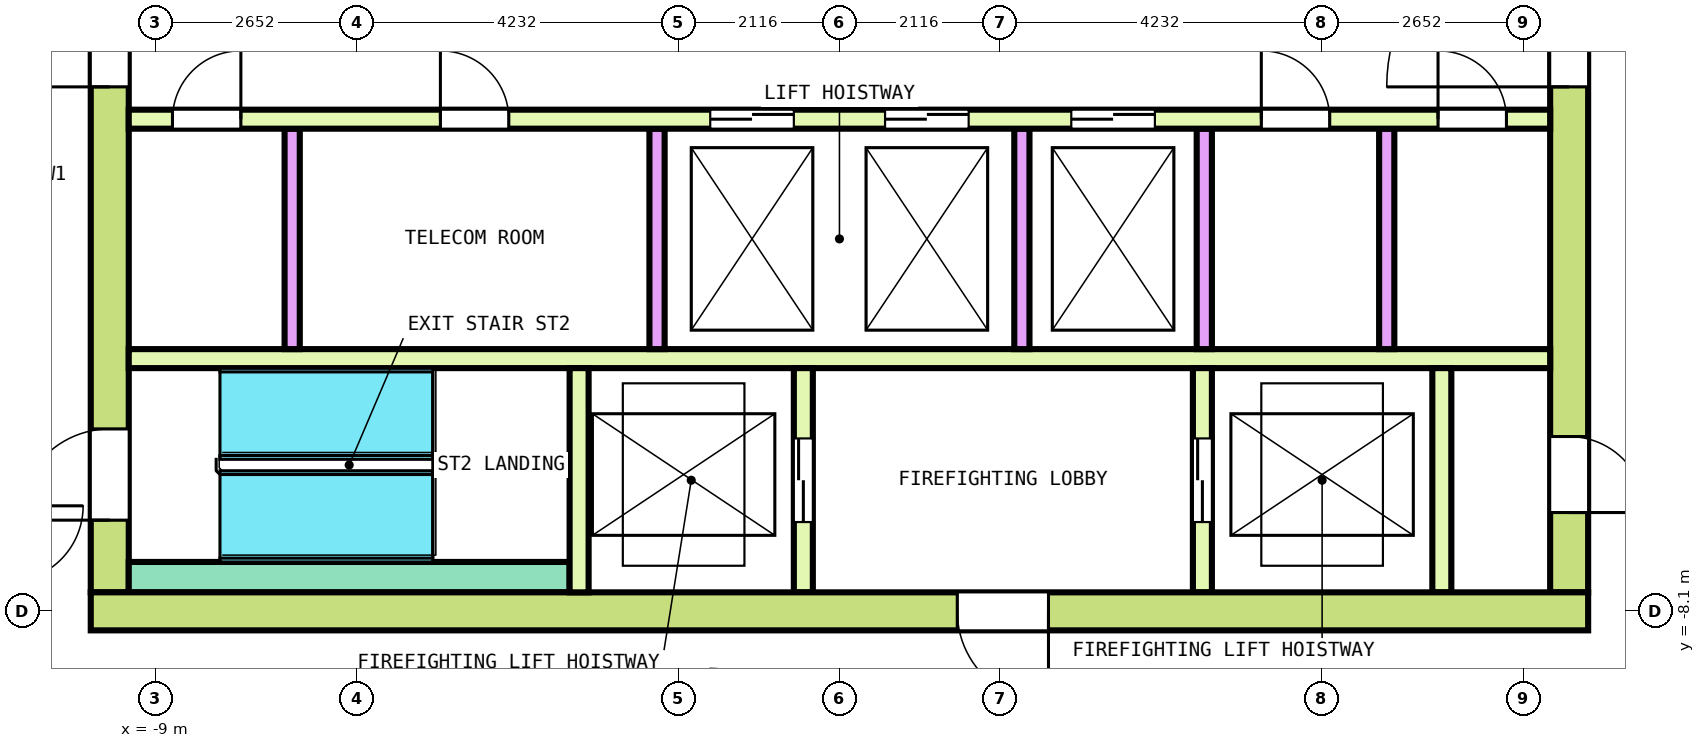
"""IFC4 building model, lengths in metres.
Left out: names, types, materials, properties, quantities, classifications, styles, units other than length and angle.
Written with IfcOpenShell. Run it as: python <this file> out.ifc"""

import sys

from ifc_helpers import new_model, si_unit, direction, frame, frame_2d, origin, place, context, subcontext, project, spatial, rectangle, extrude, element, fill, save


model = new_model("IFC4")
c1 = context("Model", 3, precision=1e-05, world=origin(), true_north=direction((0.0, 1.0)))
c2 = subcontext(c1, "Body", "Model", "MODEL_VIEW")
j1 = project(units=[si_unit("LENGTHUNIT", "METRE"), si_unit("PLANEANGLEUNIT", "RADIAN")], contexts=[c1])
p1 = place(None, origin())
s1 = spatial("IfcSite", under=j1, at=p1, CompositionType="ELEMENT")
p2 = place(p1, origin())
s2 = spatial("IfcBuilding", under=s1, at=p2, CompositionType="ELEMENT")
p3 = place(p2, frame((0.0, 0.0, 275.0)))
s3 = spatial("IfcBuildingStorey", under=s2, at=p3, CompositionType="ELEMENT", Elevation=275.0)
p4 = place(p3, frame((-9.85, -8.1, 0.0), z_axis=(0.0, 0.0, 1.0), x_axis=(1.0, 0.0, 0.0)))
e1 = element("IfcWall", 1, at=p4, inside=s3, PredefinedType="SHEAR", context=c2, shape_type="SweptSolid", body=[
    extrude(rectangle(XDim=19.7, YDim=0.5, at=frame_2d((9.85, 0.0))), origin(), (0.0, 0.0, 1.0), 3.7),
])
p5 = place(p4, frame((11.4, 0.0, 0.0)))
e2 = element("IfcOpeningElement", 2, at=p5, cuts=e1, PredefinedType="OPENING", context=c2, shape_type="SweptSolid", body=[
    extrude(rectangle(XDim=1.2, YDim=2.1, at=frame_2d((0.6, 1.05))), frame((0.0, 0.26, 0.0), z_axis=(0.0, -1.0, 0.0), x_axis=(1.0, 0.0, 0.0)), (0.0, 0.0, 1.0), 0.52),
])
p6 = place(p3, frame((-9.6, -7.85, 0.0), z_axis=(0.0, 0.0, 1.0), x_axis=(0.0, 1.0, 0.0)))
e3 = element("IfcWall", 3, at=p6, inside=s3, PredefinedType="SHEAR", context=c2, shape_type="SweptSolid", body=[
    extrude(rectangle(XDim=15.7, YDim=0.5, at=frame_2d((7.85, 0.0))), origin(), (0.0, 0.0, 1.0), 3.7),
])
p7 = place(p6, frame((6.65, 0.0, 0.0)))
e4 = element("IfcOpeningElement", 4, at=p7, cuts=e3, PredefinedType="OPENING", context=c2, shape_type="SweptSolid", body=[
    extrude(rectangle(XDim=2.4, YDim=2.1, at=frame_2d((1.2, 1.05))), frame((0.0, 0.26, 0.0), z_axis=(0.0, -1.0, 0.0), x_axis=(1.0, 0.0, 0.0)), (0.0, 0.0, 1.0), 0.52),
])
p8 = place(p6, frame((13.55, 0.0, 0.0)))
e5 = element("IfcOpeningElement", 5, at=p8, cuts=e3, PredefinedType="OPENING", context=c2, shape_type="SweptSolid", body=[
    extrude(rectangle(XDim=1.2, YDim=2.1, at=frame_2d((0.6, 1.05))), frame((0.0, 0.26, 0.0), z_axis=(0.0, -1.0, 0.0), x_axis=(1.0, 0.0, 0.0)), (0.0, 0.0, 1.0), 0.52),
])
p9 = place(p6, frame((0.95, 0.0, 0.0)))
e6 = element("IfcOpeningElement", 6, at=p9, cuts=e3, PredefinedType="OPENING", context=c2, shape_type="SweptSolid", body=[
    extrude(rectangle(XDim=1.2, YDim=2.1, at=frame_2d((0.6, 1.05))), frame((0.0, 0.26, 0.0), z_axis=(0.0, -1.0, 0.0), x_axis=(1.0, 0.0, 0.0)), (0.0, 0.0, 1.0), 0.52),
])
p10 = place(p3, frame((9.6, -7.85, 0.0), z_axis=(0.0, 0.0, 1.0), x_axis=(0.0, 1.0, 0.0)))
e7 = element("IfcWall", 7, at=p10, inside=s3, PredefinedType="SHEAR", context=c2, shape_type="SweptSolid", body=[
    extrude(rectangle(XDim=15.7, YDim=0.5, at=frame_2d((7.85, 0.0))), origin(), (0.0, 0.0, 1.0), 3.7),
])
p11 = place(p10, frame((6.65, 0.0, 0.0)))
e8 = element("IfcOpeningElement", 8, at=p11, cuts=e7, PredefinedType="OPENING", context=c2, shape_type="SweptSolid", body=[
    extrude(rectangle(XDim=2.4, YDim=2.1, at=frame_2d((1.2, 1.05))), frame((0.0, 0.26, 0.0), z_axis=(0.0, -1.0, 0.0), x_axis=(1.0, 0.0, 0.0)), (0.0, 0.0, 1.0), 0.52),
])
p12 = place(p10, frame((13.55, 0.0, 0.0)))
e9 = element("IfcOpeningElement", 9, at=p12, cuts=e7, PredefinedType="OPENING", context=c2, shape_type="SweptSolid", body=[
    extrude(rectangle(XDim=1.2, YDim=2.1, at=frame_2d((0.6, 1.05))), frame((0.0, 0.26, 0.0), z_axis=(0.0, -1.0, 0.0), x_axis=(1.0, 0.0, 0.0)), (0.0, 0.0, 1.0), 0.52),
])
p13 = place(p10, frame((1.05, 0.0, 0.0)))
e10 = element("IfcOpeningElement", 10, at=p13, cuts=e7, PredefinedType="OPENING", context=c2, shape_type="SweptSolid", body=[
    extrude(rectangle(XDim=1.0, YDim=2.1, at=frame_2d((0.5, 1.05))), frame((0.0, 0.26, 0.0), z_axis=(0.0, -1.0, 0.0), x_axis=(1.0, 0.0, 0.0)), (0.0, 0.0, 1.0), 0.52),
])
p14 = place(p3, frame((-9.35, -1.625, 0.0), z_axis=(0.0, 0.0, 1.0), x_axis=(1.0, 0.0, 0.0)))
e11 = element("IfcWall", 11, at=p14, inside=s3, PredefinedType="SOLIDWALL", context=c2, shape_type="SweptSolid", body=[
    extrude(rectangle(XDim=18.7, YDim=0.25, at=frame_2d((9.35, 0.0))), origin(), (0.0, 0.0, 1.0), 3.7),
])
p15 = place(p14, frame((7.65, 0.0, 0.0)))
e12 = element("IfcOpeningElement", 12, at=p15, cuts=e11, PredefinedType="OPENING", context=c2, shape_type="SweptSolid", body=[
    extrude(rectangle(XDim=1.1, YDim=2.1, at=frame_2d((0.55, 1.05))), frame((0.0, 0.135, 0.0), z_axis=(0.0, -1.0, 0.0), x_axis=(1.0, 0.0, 0.0)), (0.0, 0.0, 1.0), 0.27),
])
p16 = place(p14, frame((9.95, 0.0, 0.0)))
e13 = element("IfcOpeningElement", 13, at=p16, cuts=e11, PredefinedType="OPENING", context=c2, shape_type="SweptSolid", body=[
    extrude(rectangle(XDim=1.1, YDim=2.1, at=frame_2d((0.55, 1.05))), frame((0.0, 0.135, 0.0), z_axis=(0.0, -1.0, 0.0), x_axis=(1.0, 0.0, 0.0)), (0.0, 0.0, 1.0), 0.27),
])
p17 = place(p14, frame((12.4, 0.0, 0.0)))
e14 = element("IfcOpeningElement", 14, at=p17, cuts=e11, PredefinedType="OPENING", context=c2, shape_type="SweptSolid", body=[
    extrude(rectangle(XDim=1.1, YDim=2.1, at=frame_2d((0.55, 1.05))), frame((0.0, 0.135, 0.0), z_axis=(0.0, -1.0, 0.0), x_axis=(1.0, 0.0, 0.0)), (0.0, 0.0, 1.0), 0.27),
])
p18 = place(p14, frame((0.575, 0.0, 0.0)))
e15 = element("IfcOpeningElement", 15, at=p18, cuts=e11, PredefinedType="OPENING", context=c2, shape_type="SweptSolid", body=[
    extrude(rectangle(XDim=0.9, YDim=2.1, at=frame_2d((0.45, 1.05))), frame((0.0, 0.135, 0.0), z_axis=(0.0, -1.0, 0.0), x_axis=(1.0, 0.0, 0.0)), (0.0, 0.0, 1.0), 0.27),
])
p19 = place(p14, frame((4.1, 0.0, 0.0)))
e16 = element("IfcOpeningElement", 16, at=p19, cuts=e11, PredefinedType="OPENING", context=c2, shape_type="SweptSolid", body=[
    extrude(rectangle(XDim=0.9, YDim=2.1, at=frame_2d((0.45, 1.05))), frame((0.0, 0.135, 0.0), z_axis=(0.0, -1.0, 0.0), x_axis=(1.0, 0.0, 0.0)), (0.0, 0.0, 1.0), 0.27),
])
p20 = place(p14, frame((14.9, 0.0, 0.0)))
e17 = element("IfcOpeningElement", 17, at=p20, cuts=e11, PredefinedType="OPENING", context=c2, shape_type="SweptSolid", body=[
    extrude(rectangle(XDim=0.9, YDim=2.1, at=frame_2d((0.45, 1.05))), frame((0.0, 0.135, 0.0), z_axis=(0.0, -1.0, 0.0), x_axis=(1.0, 0.0, 0.0)), (0.0, 0.0, 1.0), 0.27),
])
p21 = place(p14, frame((17.225, 0.0, 0.0)))
e18 = element("IfcOpeningElement", 18, at=p21, cuts=e11, PredefinedType="OPENING", context=c2, shape_type="SweptSolid", body=[
    extrude(rectangle(XDim=0.9, YDim=2.1, at=frame_2d((0.45, 1.05))), frame((0.0, 0.135, 0.0), z_axis=(0.0, -1.0, 0.0), x_axis=(1.0, 0.0, 0.0)), (0.0, 0.0, 1.0), 0.27),
])
p22 = place(p3, frame((-9.35, -4.775, 0.0), z_axis=(0.0, 0.0, 1.0), x_axis=(1.0, 0.0, 0.0)))
e19 = element("IfcWall", 19, at=p22, inside=s3, PredefinedType="SOLIDWALL", context=c2, shape_type="SweptSolid", body=[
    extrude(rectangle(XDim=18.7, YDim=0.25, at=frame_2d((9.35, 0.0))), origin(), (0.0, 0.0, 1.0), 3.7),
])
for number, where, z_axis, x_axis in (
    (20, (-7.2, -4.65, 0.0), (0.0, 0.0, 1.0), (0.0, 1.0, 0.0)),
    (21, (-2.4, -4.65, 0.0), (0.0, 0.0, 1.0), (0.0, 1.0, 0.0)),
    (22, (2.4, -4.65, 0.0), (0.0, 0.0, 1.0), (0.0, 1.0, 0.0)),
    (23, (4.8, -4.65, 0.0), (0.0, 0.0, 1.0), (0.0, 1.0, 0.0)),
    (24, (7.2, -4.65, 0.0), (0.0, 0.0, 1.0), (0.0, 1.0, 0.0)),
):
    element("IfcWall", number, at=place(p3, frame(where, z_axis=z_axis, x_axis=x_axis)), inside=s3, PredefinedType="SOLIDWALL", context=c2, shape_type="SweptSolid", body=[
        extrude(rectangle(XDim=2.9, YDim=0.2, at=frame_2d((1.45, 0.0))), origin(), (0.0, 0.0, 1.0), 3.7),
    ])
p23 = place(p3, frame((-9.35, -7.65, 0.0), z_axis=(0.0, 0.0, 1.0), x_axis=(1.0, 0.0, 0.0)))
e25 = element("IfcWall", 25, at=p23, inside=s3, PredefinedType="SOLIDWALL", context=c2, shape_type="SweptSolid", body=[
    extrude(rectangle(XDim=5.8, YDim=0.4, at=frame_2d((2.9, 0.0))), origin(), (0.0, 0.0, 1.0), 3.7),
])
p24 = place(p3, frame((-3.425, -7.85, 0.0), z_axis=(0.0, 0.0, 1.0), x_axis=(0.0, 1.0, 0.0)))
e26 = element("IfcWall", 26, at=p24, inside=s3, PredefinedType="SOLIDWALL", context=c2, shape_type="SweptSolid", body=[
    extrude(rectangle(XDim=2.95, YDim=0.25, at=frame_2d((1.475, 0.0))), origin(), (0.0, 0.0, 1.0), 3.7),
])
p25 = place(p3, frame((-0.475, -7.85, 0.0), z_axis=(0.0, 0.0, 1.0), x_axis=(0.0, 1.0, 0.0)))
e27 = element("IfcWall", 27, at=p25, inside=s3, PredefinedType="SOLIDWALL", context=c2, shape_type="SweptSolid", body=[
    extrude(rectangle(XDim=2.95, YDim=0.25, at=frame_2d((1.475, 0.0))), origin(), (0.0, 0.0, 1.0), 3.7),
])
p26 = place(p25, frame((0.925, 0.0, 0.0)))
e28 = element("IfcOpeningElement", 28, at=p26, cuts=e27, PredefinedType="OPENING", context=c2, shape_type="SweptSolid", body=[
    extrude(rectangle(XDim=1.1, YDim=2.1, at=frame_2d((0.55, 1.05))), frame((0.0, 0.135, 0.0), z_axis=(0.0, -1.0, 0.0), x_axis=(1.0, 0.0, 0.0)), (0.0, 0.0, 1.0), 0.27),
])
p27 = place(p3, frame((4.775, -7.85, 0.0), z_axis=(0.0, 0.0, 1.0), x_axis=(0.0, 1.0, 0.0)))
e29 = element("IfcWall", 29, at=p27, inside=s3, PredefinedType="SOLIDWALL", context=c2, shape_type="SweptSolid", body=[
    extrude(rectangle(XDim=2.95, YDim=0.25, at=frame_2d((1.475, 0.0))), origin(), (0.0, 0.0, 1.0), 3.7),
])
p28 = place(p27, frame((0.925, 0.0, 0.0)))
e30 = element("IfcOpeningElement", 30, at=p28, cuts=e29, PredefinedType="OPENING", context=c2, shape_type="SweptSolid", body=[
    extrude(rectangle(XDim=1.1, YDim=2.1, at=frame_2d((0.55, 1.05))), frame((0.0, 0.135, 0.0), z_axis=(0.0, -1.0, 0.0), x_axis=(1.0, 0.0, 0.0)), (0.0, 0.0, 1.0), 0.27),
])
p29 = place(p3, frame((7.925, -7.85, 0.0), z_axis=(0.0, 0.0, 1.0), x_axis=(0.0, 1.0, 0.0)))
e31 = element("IfcWall", 31, at=p29, inside=s3, PredefinedType="SOLIDWALL", context=c2, shape_type="SweptSolid", body=[
    extrude(rectangle(XDim=2.95, YDim=0.25, at=frame_2d((1.475, 0.0))), origin(), (0.0, 0.0, 1.0), 3.7),
])
p30 = place(p15, origin())
e32 = element("IfcDoor", 32, at=p30, inside=s3, OperationType="DOUBLE_DOOR_SLIDING", PredefinedType="DOOR", context=c2, shape_type="SweptSolid", body=[
    extrude(rectangle(XDim=1.1, YDim=2.1, at=frame_2d((0.55, 1.05))), frame((0.0, 0.075, 0.0), z_axis=(0.0, -1.0, 0.0), x_axis=(1.0, 0.0, 0.0)), (0.0, 0.0, 1.0), 0.15),
])
fill(e12, e32)
p31 = place(p16, origin())
e33 = element("IfcDoor", 33, at=p31, inside=s3, OperationType="DOUBLE_DOOR_SLIDING", PredefinedType="DOOR", context=c2, shape_type="SweptSolid", body=[
    extrude(rectangle(XDim=1.1, YDim=2.1, at=frame_2d((0.55, 1.05))), frame((0.0, 0.075, 0.0), z_axis=(0.0, -1.0, 0.0), x_axis=(1.0, 0.0, 0.0)), (0.0, 0.0, 1.0), 0.15),
])
fill(e13, e33)
p32 = place(p17, origin())
e34 = element("IfcDoor", 34, at=p32, inside=s3, OperationType="DOUBLE_DOOR_SLIDING", PredefinedType="DOOR", context=c2, shape_type="SweptSolid", body=[
    extrude(rectangle(XDim=1.1, YDim=2.1, at=frame_2d((0.55, 1.05))), frame((0.0, 0.075, 0.0), z_axis=(0.0, -1.0, 0.0), x_axis=(1.0, 0.0, 0.0)), (0.0, 0.0, 1.0), 0.15),
])
fill(e14, e34)
p33 = place(p26, origin())
e35 = element("IfcDoor", 35, at=p33, inside=s3, OperationType="DOUBLE_DOOR_SLIDING", PredefinedType="DOOR", context=c2, shape_type="SweptSolid", body=[
    extrude(rectangle(XDim=1.1, YDim=2.1, at=frame_2d((0.55, 1.05))), frame((0.0, 0.075, 0.0), z_axis=(0.0, -1.0, 0.0), x_axis=(1.0, 0.0, 0.0)), (0.0, 0.0, 1.0), 0.15),
])
fill(e28, e35)
p34 = place(p28, origin())
e36 = element("IfcDoor", 36, at=p34, inside=s3, OperationType="DOUBLE_DOOR_SLIDING", PredefinedType="DOOR", context=c2, shape_type="SweptSolid", body=[
    extrude(rectangle(XDim=1.1, YDim=2.1, at=frame_2d((0.55, 1.05))), frame((0.0, 0.075, 0.0), z_axis=(0.0, -1.0, 0.0), x_axis=(1.0, 0.0, 0.0)), (0.0, 0.0, 1.0), 0.15),
])
fill(e30, e36)
p35 = place(p7, origin())
e37 = element("IfcDoor", 37, at=p35, inside=s3, OperationType="DOUBLE_DOOR_SINGLE_SWING", PredefinedType="DOOR", context=c2, shape_type="SweptSolid", body=[
    extrude(rectangle(XDim=2.4, YDim=2.1, at=frame_2d((1.2, 1.05))), frame((0.0, 0.2, 0.0), z_axis=(0.0, -1.0, 0.0), x_axis=(1.0, 0.0, 0.0)), (0.0, 0.0, 1.0), 0.4),
])
fill(e4, e37)
p36 = place(p11, origin())
e38 = element("IfcDoor", 38, at=p36, inside=s3, OperationType="DOUBLE_DOOR_SINGLE_SWING", PredefinedType="DOOR", context=c2, shape_type="SweptSolid", body=[
    extrude(rectangle(XDim=2.4, YDim=2.1, at=frame_2d((1.2, 1.05))), frame((0.0, 0.2, 0.0), z_axis=(0.0, -1.0, 0.0), x_axis=(1.0, 0.0, 0.0)), (0.0, 0.0, 1.0), 0.4),
])
fill(e8, e38)
p37 = place(p9, origin())
e39 = element("IfcDoor", 39, at=p37, inside=s3, OperationType="SINGLE_SWING_LEFT", PredefinedType="DOOR", context=c2, shape_type="SweptSolid", body=[
    extrude(rectangle(XDim=1.2, YDim=2.1, at=frame_2d((0.6, 1.05))), frame((0.0, 0.2, 0.0), z_axis=(0.0, -1.0, 0.0), x_axis=(1.0, 0.0, 0.0)), (0.0, 0.0, 1.0), 0.4),
])
fill(e6, e39)
p38 = place(p5, origin())
e40 = element("IfcDoor", 40, at=p38, inside=s3, OperationType="SINGLE_SWING_LEFT", PredefinedType="DOOR", context=c2, shape_type="SweptSolid", body=[
    extrude(rectangle(XDim=1.2, YDim=2.1, at=frame_2d((0.6, 1.05))), frame((0.0, 0.2, 0.0), z_axis=(0.0, -1.0, 0.0), x_axis=(1.0, 0.0, 0.0)), (0.0, 0.0, 1.0), 0.4),
])
fill(e2, e40)
p39 = place(p13, origin())
e41 = element("IfcDoor", 41, at=p39, inside=s3, OperationType="SINGLE_SWING_LEFT", PredefinedType="DOOR", context=c2, shape_type="SweptSolid", body=[
    extrude(rectangle(XDim=1.0, YDim=2.1, at=frame_2d((0.5, 1.05))), frame((0.0, 0.2, 0.0), z_axis=(0.0, -1.0, 0.0), x_axis=(1.0, 0.0, 0.0)), (0.0, 0.0, 1.0), 0.4),
])
fill(e10, e41)
p40 = place(p18, origin())
e42 = element("IfcDoor", 42, at=p40, inside=s3, OperationType="SINGLE_SWING_RIGHT", PredefinedType="DOOR", context=c2, shape_type="SweptSolid", body=[
    extrude(rectangle(XDim=0.9, YDim=2.1, at=frame_2d((0.45, 1.05))), frame((0.0, 0.075, 0.0), z_axis=(0.0, -1.0, 0.0), x_axis=(1.0, 0.0, 0.0)), (0.0, 0.0, 1.0), 0.15),
])
fill(e15, e42)
p41 = place(p19, origin())
e43 = element("IfcDoor", 43, at=p41, inside=s3, OperationType="SINGLE_SWING_LEFT", PredefinedType="DOOR", context=c2, shape_type="SweptSolid", body=[
    extrude(rectangle(XDim=0.9, YDim=2.1, at=frame_2d((0.45, 1.05))), frame((0.0, 0.075, 0.0), z_axis=(0.0, -1.0, 0.0), x_axis=(1.0, 0.0, 0.0)), (0.0, 0.0, 1.0), 0.15),
])
fill(e16, e43)
p42 = place(p20, origin())
e44 = element("IfcDoor", 44, at=p42, inside=s3, OperationType="SINGLE_SWING_RIGHT", PredefinedType="DOOR", context=c2, shape_type="SweptSolid", body=[
    extrude(rectangle(XDim=0.9, YDim=2.1, at=frame_2d((0.45, 1.05))), frame((0.0, 0.075, 0.0), z_axis=(0.0, -1.0, 0.0), x_axis=(1.0, 0.0, 0.0)), (0.0, 0.0, 1.0), 0.15),
])
fill(e17, e44)
p43 = place(p21, origin())
e45 = element("IfcDoor", 45, at=p43, inside=s3, OperationType="SINGLE_SWING_LEFT", PredefinedType="DOOR", context=c2, shape_type="SweptSolid", body=[
    extrude(rectangle(XDim=0.9, YDim=2.1, at=frame_2d((0.45, 1.05))), frame((0.0, 0.075, 0.0), z_axis=(0.0, -1.0, 0.0), x_axis=(1.0, 0.0, 0.0)), (0.0, 0.0, 1.0), 0.15),
])
fill(e18, e45)
save(model, sys.argv[1])
